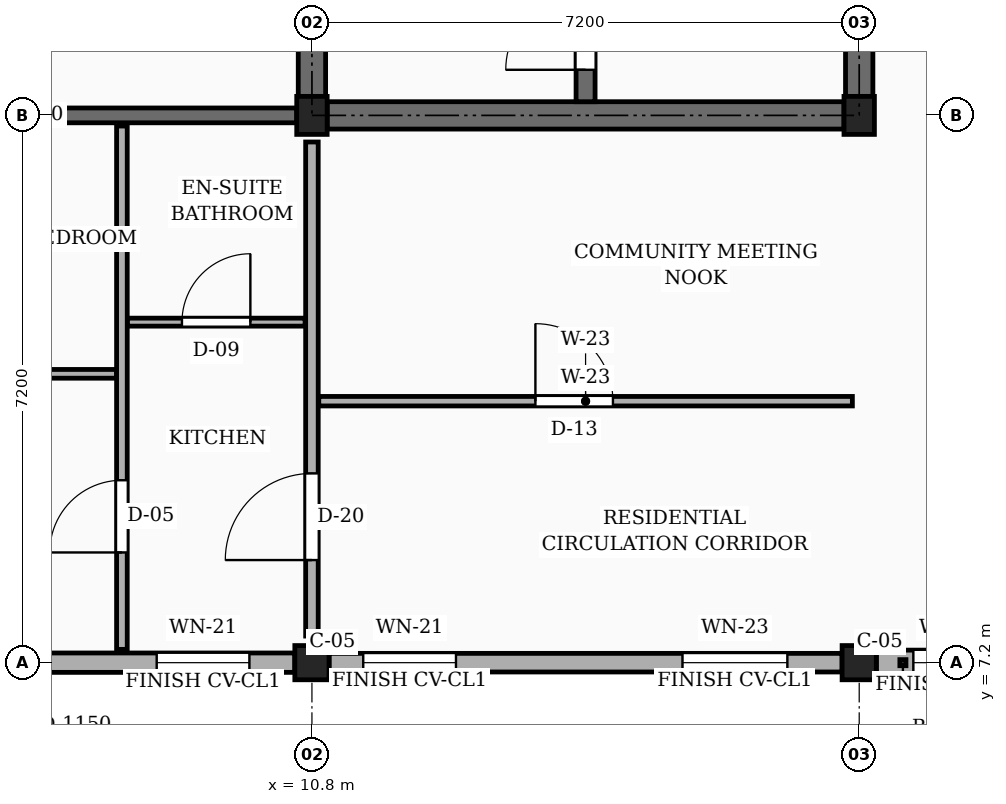
"""IFC4 building model, lengths in metres.
Left out: names, types, materials, properties, quantities, classifications, styles, units other than length and angle.
Written with IfcOpenShell. Run it as: python <this file> out.ifc"""

import sys

from ifc_helpers import new_model, si_unit, direction, frame, frame_2d, origin, origin_2d, place, context, subcontext, project, spatial, rectangle, extrude, element, fill, save


model = new_model("IFC4")
c1 = context("Model", 3, precision=1e-05, world=origin(), true_north=direction((0.0, 1.0)))
c2 = subcontext(c1, "Body", "Model", "MODEL_VIEW")
j1 = project(units=[si_unit("LENGTHUNIT", "METRE"), si_unit("PLANEANGLEUNIT", "RADIAN")], contexts=[c1])
p1 = place(None, origin())
s1 = spatial("IfcSite", under=j1, at=p1, CompositionType="ELEMENT")
p2 = place(p1, origin())
s2 = spatial("IfcBuilding", under=s1, at=p2, CompositionType="ELEMENT")
p3 = place(p2, frame((0.0, 0.0, 39.15)))
s3 = spatial("IfcBuildingStorey", under=s2, at=p3, CompositionType="ELEMENT", Elevation=39.15)
p4 = place(p3, frame((10.8, 7.2, 0.0), z_axis=(0.0, 0.0, 1.0), x_axis=(1.0, 0.0, 0.0)))
e1 = element("IfcColumn", 1, at=p4, inside=s3, PredefinedType="COLUMN", context=c2, shape_type="SweptSolid", body=[
    extrude(rectangle(XDim=0.45, YDim=0.45, at=origin_2d()), origin(), (0.0, 0.0, 1.0), 3.15),
])
p5 = place(p3, frame((10.8, 14.4, 0.0), z_axis=(0.0, 0.0, 1.0), x_axis=(1.0, 0.0, 0.0)))
e2 = element("IfcColumn", 2, at=p5, inside=s3, PredefinedType="COLUMN", context=c2, shape_type="SweptSolid", body=[
    extrude(rectangle(XDim=0.4, YDim=0.5, at=origin_2d()), origin(), (0.0, 0.0, 1.0), 3.15),
])
p6 = place(p3, frame((18.0, 7.2, 0.0), z_axis=(0.0, 0.0, 1.0), x_axis=(1.0, 0.0, 0.0)))
e3 = element("IfcColumn", 3, at=p6, inside=s3, PredefinedType="COLUMN", context=c2, shape_type="SweptSolid", body=[
    extrude(rectangle(XDim=0.45, YDim=0.45, at=origin_2d()), origin(), (0.0, 0.0, 1.0), 3.15),
])
p7 = place(p3, frame((18.0, 14.4, 0.0), z_axis=(0.0, 0.0, 1.0), x_axis=(1.0, 0.0, 0.0)))
e4 = element("IfcColumn", 4, at=p7, inside=s3, PredefinedType="COLUMN", context=c2, shape_type="SweptSolid", body=[
    extrude(rectangle(XDim=0.4, YDim=0.5, at=origin_2d()), origin(), (0.0, 0.0, 1.0), 3.15),
])
p8 = place(p3, frame((3.825, 14.4, 0.0), z_axis=(0.0, 0.0, 1.0), x_axis=(1.0, 0.0, 0.0)))
e5 = element("IfcWall", 5, at=p8, inside=s3, PredefinedType="SOLIDWALL", context=c2, shape_type="SweptSolid", body=[
    extrude(rectangle(XDim=6.775, YDim=0.195, at=frame_2d((3.388, 0.0))), origin(), (0.0, 0.0, 1.0), 2.17),
])
p9 = place(p8, frame((1.35, 0.0, 0.0)))
e6 = element("IfcOpeningElement", 6, at=p9, cuts=e5, PredefinedType="OPENING", context=c2, shape_type="SweptSolid", body=[
    extrude(rectangle(XDim=0.98, YDim=2.12, at=frame_2d((0.49, 1.06))), frame((0.0, 0.107, 0.0), z_axis=(0.0, -1.0, 0.0), x_axis=(1.0, 0.0, 0.0)), (0.0, 0.0, 1.0), 0.215),
])
p10 = place(p3, frame((3.825, 7.2, 0.0), z_axis=(0.0, 0.0, 1.0), x_axis=(1.0, 0.0, 0.0)))
e7 = element("IfcWall", 7, at=p10, inside=s3, PredefinedType="SOLIDWALL", context=c2, shape_type="SweptSolid", body=[
    extrude(rectangle(XDim=6.75, YDim=0.255, at=frame_2d((3.375, 0.0))), origin(), (0.0, 0.0, 1.0), 2.44),
])
p11 = place(p10, frame((1.778, 0.0, 0.78)))
e8 = element("IfcOpeningElement", 8, at=p11, cuts=e7, PredefinedType="OPENING", context=c2, shape_type="SweptSolid", body=[
    extrude(rectangle(XDim=1.06, YDim=1.36, at=frame_2d((0.53, 0.68))), frame((0.0, 0.137, 0.0), z_axis=(0.0, -1.0, 0.0), x_axis=(1.0, 0.0, 0.0)), (0.0, 0.0, 1.0), 0.275),
])
p12 = place(p10, frame((4.933, 0.0, 0.78)))
e9 = element("IfcOpeningElement", 9, at=p12, cuts=e7, PredefinedType="OPENING", context=c2, shape_type="SweptSolid", body=[
    extrude(rectangle(XDim=1.22, YDim=1.36, at=frame_2d((0.61, 0.68))), frame((0.0, 0.137, 0.0), z_axis=(0.0, -1.0, 0.0), x_axis=(1.0, 0.0, 0.0)), (0.0, 0.0, 1.0), 0.275),
])
p13 = place(p3, frame((11.025, 7.2, 0.0), z_axis=(0.0, 0.0, 1.0), x_axis=(1.0, 0.0, 0.0)))
e10 = element("IfcWall", 10, at=p13, inside=s3, PredefinedType="SOLIDWALL", context=c2, shape_type="SweptSolid", body=[
    extrude(rectangle(XDim=6.75, YDim=0.245, at=frame_2d((3.375, 0.0))), origin(), (0.0, 0.0, 1.0), 2.44),
])
p14 = place(p13, frame((0.45, 0.0, 0.78)))
e11 = element("IfcOpeningElement", 11, at=p14, cuts=e10, PredefinedType="OPENING", context=c2, shape_type="SweptSolid", body=[
    extrude(rectangle(XDim=1.22, YDim=1.36, at=frame_2d((0.61, 0.68))), frame((0.0, 0.133, 0.0), z_axis=(0.0, -1.0, 0.0), x_axis=(1.0, 0.0, 0.0)), (0.0, 0.0, 1.0), 0.265),
])
p15 = place(p13, frame((4.65, 0.0, 0.78)))
e12 = element("IfcOpeningElement", 12, at=p15, cuts=e10, PredefinedType="OPENING", context=c2, shape_type="SweptSolid", body=[
    extrude(rectangle(XDim=1.38, YDim=1.36, at=frame_2d((0.69, 0.68))), frame((0.0, 0.133, 0.0), z_axis=(0.0, -1.0, 0.0), x_axis=(1.0, 0.0, 0.0)), (0.0, 0.0, 1.0), 0.265),
])
p16 = place(p3, frame((18.225, 7.2, 0.0), z_axis=(0.0, 0.0, 1.0), x_axis=(1.0, 0.0, 0.0)))
e13 = element("IfcWall", 13, at=p16, inside=s3, PredefinedType="SOLIDWALL", context=c2, shape_type="SweptSolid", body=[
    extrude(rectangle(XDim=6.75, YDim=0.33, at=frame_2d((3.375, 0.0))), origin(), (0.0, 0.0, 1.0), 2.44),
])
p17 = place(p16, frame((0.488, 0.0, 0.78)))
e14 = element("IfcOpeningElement", 14, at=p17, cuts=e13, PredefinedType="OPENING", context=c2, shape_type="SweptSolid", body=[
    extrude(rectangle(XDim=1.04, YDim=1.26, at=frame_2d((0.52, 0.63))), frame((0.0, 0.175, 0.0), z_axis=(0.0, -1.0, 0.0), x_axis=(1.0, 0.0, 0.0)), (0.0, 0.0, 1.0), 0.35),
])
p18 = place(p16, frame((2.355, 0.0, 0.78)))
e15 = element("IfcOpeningElement", 15, at=p18, cuts=e13, PredefinedType="OPENING", context=c2, shape_type="SweptSolid", body=[
    extrude(rectangle(XDim=0.94, YDim=1.44, at=frame_2d((0.47, 0.72))), frame((0.0, 0.175, 0.0), z_axis=(0.0, -1.0, 0.0), x_axis=(1.0, 0.0, 0.0)), (0.0, 0.0, 1.0), 0.35),
])
p19 = place(p16, frame((4.617, 0.0, 0.78)))
e16 = element("IfcOpeningElement", 16, at=p19, cuts=e13, PredefinedType="OPENING", context=c2, shape_type="SweptSolid", body=[
    extrude(rectangle(XDim=1.15, YDim=1.44, at=frame_2d((0.575, 0.72))), frame((0.0, 0.175, 0.0), z_axis=(0.0, -1.0, 0.0), x_axis=(1.0, 0.0, 0.0)), (0.0, 0.0, 1.0), 0.35),
])
p20 = place(p3, frame((10.8, 14.65, 0.0), z_axis=(0.0, 0.0, 1.0), x_axis=(0.0, 1.0, 0.0)))
e17 = element("IfcWall", 17, at=p20, inside=s3, PredefinedType="SHEAR", context=c2, shape_type="SweptSolid", body=[
    extrude(rectangle(XDim=6.7, YDim=0.36, at=frame_2d((3.35, 0.0))), origin(), (0.0, 0.0, 1.0), 2.87),
])
p21 = place(p3, frame((18.0, 14.65, 0.0), z_axis=(0.0, 0.0, 1.0), x_axis=(0.0, 1.0, 0.0)))
e18 = element("IfcWall", 18, at=p21, inside=s3, PredefinedType="SHEAR", context=c2, shape_type="SweptSolid", body=[
    extrude(rectangle(XDim=6.7, YDim=0.36, at=frame_2d((3.35, 0.0))), origin(), (0.0, 0.0, 1.0), 2.87),
])
p22 = place(p21, frame((1.5, 0.0, 0.0)))
e19 = element("IfcOpeningElement", 19, at=p22, cuts=e18, PredefinedType="OPENING", context=c2, shape_type="SweptSolid", body=[
    extrude(rectangle(XDim=1.1, YDim=2.15, at=frame_2d((0.55, 1.075))), frame((0.0, 0.19, 0.0), z_axis=(0.0, -1.0, 0.0), x_axis=(1.0, 0.0, 0.0)), (0.0, 0.0, 1.0), 0.38),
])
p23 = place(p3, frame((11.0, 14.4, 0.0), z_axis=(0.0, 0.0, 1.0), x_axis=(1.0, 0.0, 0.0)))
e20 = element("IfcWall", 20, at=p23, inside=s3, PredefinedType="SHEAR", context=c2, shape_type="SweptSolid", body=[
    extrude(rectangle(XDim=6.8, YDim=0.36, at=frame_2d((3.4, 0.0))), origin(), (0.0, 0.0, 1.0), 2.87),
])
p24 = place(p3, frame((14.4, 14.58, 0.0), z_axis=(0.0, 0.0, 1.0), x_axis=(0.0, 1.0, 0.0)))
e21 = element("IfcWall", 21, at=p24, inside=s3, PredefinedType="SHEAR", context=c2, shape_type="SweptSolid", body=[
    extrude(rectangle(XDim=6.84, YDim=0.25, at=frame_2d((3.42, 0.0))), origin(), (0.0, 0.0, 1.0), 2.87),
])
p25 = place(p24, frame((0.42, 0.0, 0.0)))
e22 = element("IfcOpeningElement", 22, at=p25, cuts=e21, PredefinedType="OPENING", context=c2, shape_type="SweptSolid", body=[
    extrude(rectangle(XDim=1.05, YDim=2.15, at=frame_2d((0.525, 1.075))), frame((0.0, 0.135, 0.0), z_axis=(0.0, -1.0, 0.0), x_axis=(1.0, 0.0, 0.0)), (0.0, 0.0, 1.0), 0.27),
])
p26 = place(p3, frame((10.8, 7.55, 0.0), z_axis=(0.0, 0.0, 1.0), x_axis=(0.0, 1.0, 0.0)))
e23 = element("IfcWall", 23, at=p26, inside=s3, PredefinedType="PARTITIONING", context=c2, shape_type="SweptSolid", body=[
    extrude(rectangle(XDim=6.5, YDim=0.165, at=frame_2d((3.25, 0.0))), origin(), (0.0, 0.0, 1.0), 2.305),
])
p27 = place(p26, frame((1.0, 0.0, 0.0)))
e24 = element("IfcOpeningElement", 24, at=p27, cuts=e23, PredefinedType="OPENING", context=c2, shape_type="SweptSolid", body=[
    extrude(rectangle(XDim=1.14, YDim=2.18, at=frame_2d((0.57, 1.09))), frame((0.0, 0.093, 0.0), z_axis=(0.0, -1.0, 0.0), x_axis=(1.0, 0.0, 0.0)), (0.0, 0.0, 1.0), 0.185),
])
p28 = place(p3, frame((10.89, 10.64, 0.0), z_axis=(0.0, 0.0, 1.0), x_axis=(1.0, 0.0, 0.0)))
e25 = element("IfcWall", 25, at=p28, inside=s3, PredefinedType="PARTITIONING", context=c2, shape_type="SweptSolid", body=[
    extrude(rectangle(XDim=7.02, YDim=0.125, at=frame_2d((3.51, 0.0))), origin(), (0.0, 0.0, 1.0), 2.305),
])
p29 = place(p28, frame((2.85, 0.0, 0.0)))
e26 = element("IfcOpeningElement", 26, at=p29, cuts=e25, PredefinedType="OPENING", context=c2, shape_type="SweptSolid", body=[
    extrude(rectangle(XDim=1.02, YDim=2.15, at=frame_2d((0.51, 1.075))), frame((0.0, 0.073, 0.0), z_axis=(0.0, -1.0, 0.0), x_axis=(1.0, 0.0, 0.0)), (0.0, 0.0, 1.0), 0.145),
])
p30 = place(p3, frame((3.775, 11.0, 0.0), z_axis=(0.0, 0.0, 1.0), x_axis=(1.0, 0.0, 0.0)))
e27 = element("IfcWall", 27, at=p30, inside=s3, PredefinedType="PARTITIONING", context=c2, shape_type="SweptSolid", body=[
    extrude(rectangle(XDim=4.455, YDim=0.115, at=frame_2d((2.228, 0.0))), origin(), (0.0, 0.0, 1.0), 2.305),
])
p31 = place(p30, frame((1.778, 0.0, 0.0)))
e28 = element("IfcOpeningElement", 28, at=p31, cuts=e27, PredefinedType="OPENING", context=c2, shape_type="SweptSolid", body=[
    extrude(rectangle(XDim=0.9, YDim=2.1, at=frame_2d((0.45, 1.05))), frame((0.0, 0.067, 0.0), z_axis=(0.0, -1.0, 0.0), x_axis=(1.0, 0.0, 0.0)), (0.0, 0.0, 1.0), 0.135),
])
p32 = place(p3, frame((8.37, 11.68, 0.0), z_axis=(0.0, 0.0, 1.0), x_axis=(1.0, 0.0, 0.0)))
e29 = element("IfcWall", 29, at=p32, inside=s3, PredefinedType="PARTITIONING", context=c2, shape_type="SweptSolid", body=[
    extrude(rectangle(XDim=2.34, YDim=0.105, at=frame_2d((1.17, 0.0))), origin(), (0.0, 0.0, 1.0), 2.305),
])
p33 = place(p32, frame((0.72, 0.0, 0.0)))
e30 = element("IfcOpeningElement", 30, at=p33, cuts=e29, PredefinedType="OPENING", context=c2, shape_type="SweptSolid", body=[
    extrude(rectangle(XDim=0.9, YDim=2.05, at=frame_2d((0.45, 1.025))), frame((0.0, 0.062, 0.0), z_axis=(0.0, -1.0, 0.0), x_axis=(1.0, 0.0, 0.0)), (0.0, 0.0, 1.0), 0.125),
])
p34 = place(p3, frame((8.3, 7.375, 0.0), z_axis=(0.0, 0.0, 1.0), x_axis=(0.0, 1.0, 0.0)))
e31 = element("IfcWall", 31, at=p34, inside=s3, PredefinedType="PARTITIONING", context=c2, shape_type="SweptSolid", body=[
    extrude(rectangle(XDim=6.885, YDim=0.14, at=frame_2d((3.442, 0.0))), origin(), (0.0, 0.0, 1.0), 2.305),
])
p35 = place(p34, frame((1.275, 0.0, 0.0)))
e32 = element("IfcOpeningElement", 32, at=p35, cuts=e31, PredefinedType="OPENING", context=c2, shape_type="SweptSolid", body=[
    extrude(rectangle(XDim=0.95, YDim=2.1, at=frame_2d((0.475, 1.05))), frame((0.0, 0.08, 0.0), z_axis=(0.0, -1.0, 0.0), x_axis=(1.0, 0.0, 0.0)), (0.0, 0.0, 1.0), 0.16),
])
p36 = place(p12, origin())
e33 = element("IfcWindow", 33, at=p36, inside=s3, PartitioningType="SINGLE_PANEL", PredefinedType="WINDOW", context=c2, shape_type="SweptSolid", body=[
    extrude(rectangle(XDim=1.22, YDim=1.36, at=frame_2d((0.61, 0.68))), frame((0.0, 0.03, 0.0), z_axis=(0.0, -1.0, 0.0), x_axis=(1.0, 0.0, 0.0)), (0.0, 0.0, 1.0), 0.06),
])
fill(e9, e33)
p37 = place(p14, origin())
e34 = element("IfcWindow", 34, at=p37, inside=s3, PartitioningType="SINGLE_PANEL", PredefinedType="WINDOW", context=c2, shape_type="SweptSolid", body=[
    extrude(rectangle(XDim=1.22, YDim=1.36, at=frame_2d((0.61, 0.68))), frame((0.0, 0.03, 0.0), z_axis=(0.0, -1.0, 0.0), x_axis=(1.0, 0.0, 0.0)), (0.0, 0.0, 1.0), 0.06),
])
fill(e11, e34)
p38 = place(p15, origin())
e35 = element("IfcWindow", 35, at=p38, inside=s3, PartitioningType="SINGLE_PANEL", PredefinedType="WINDOW", context=c2, shape_type="SweptSolid", body=[
    extrude(rectangle(XDim=1.38, YDim=1.36, at=frame_2d((0.69, 0.68))), frame((0.0, 0.03, 0.0), z_axis=(0.0, -1.0, 0.0), x_axis=(1.0, 0.0, 0.0)), (0.0, 0.0, 1.0), 0.06),
])
fill(e12, e35)
p39 = place(p17, origin())
e36 = element("IfcWindow", 36, at=p39, inside=s3, PartitioningType="SINGLE_PANEL", PredefinedType="WINDOW", context=c2, shape_type="SweptSolid", body=[
    extrude(rectangle(XDim=1.04, YDim=1.26, at=frame_2d((0.52, 0.63))), frame((0.0, 0.03, 0.0), z_axis=(0.0, -1.0, 0.0), x_axis=(1.0, 0.0, 0.0)), (0.0, 0.0, 1.0), 0.06),
])
fill(e14, e36)
p40 = place(p25, origin())
e37 = element("IfcDoor", 37, at=p40, inside=s3, OperationType="SINGLE_SWING_LEFT", PredefinedType="DOOR", context=c2, shape_type="SweptSolid", body=[
    extrude(rectangle(XDim=1.05, YDim=2.15, at=frame_2d((0.525, 1.075))), frame((0.0, 0.025, 0.0), z_axis=(0.0, -1.0, 0.0), x_axis=(1.0, 0.0, 0.0)), (0.0, 0.0, 1.0), 0.05),
])
fill(e22, e37)
p41 = place(p27, origin())
e38 = element("IfcDoor", 38, at=p41, inside=s3, OperationType="SINGLE_SWING_LEFT", PredefinedType="DOOR", context=c2, shape_type="SweptSolid", body=[
    extrude(rectangle(XDim=1.14, YDim=2.18, at=frame_2d((0.57, 1.09))), frame((0.0, 0.025, 0.0), z_axis=(0.0, -1.0, 0.0), x_axis=(1.0, 0.0, 0.0)), (0.0, 0.0, 1.0), 0.05),
])
fill(e24, e38)
p42 = place(p29, origin())
e39 = element("IfcDoor", 39, at=p42, inside=s3, OperationType="SINGLE_SWING_LEFT", PredefinedType="DOOR", context=c2, shape_type="SweptSolid", body=[
    extrude(rectangle(XDim=1.02, YDim=2.15, at=frame_2d((0.51, 1.075))), frame((0.0, 0.025, 0.0), z_axis=(0.0, -1.0, 0.0), x_axis=(1.0, 0.0, 0.0)), (0.0, 0.0, 1.0), 0.05),
])
fill(e26, e39)
p43 = place(p33, origin())
e40 = element("IfcDoor", 40, at=p43, inside=s3, OperationType="SINGLE_SWING_RIGHT", PredefinedType="DOOR", context=c2, shape_type="SweptSolid", body=[
    extrude(rectangle(XDim=0.9, YDim=2.05, at=frame_2d((0.45, 1.025))), frame((0.0, 0.025, 0.0), z_axis=(0.0, -1.0, 0.0), x_axis=(1.0, 0.0, 0.0)), (0.0, 0.0, 1.0), 0.05),
])
fill(e30, e40)
p44 = place(p35, origin())
e41 = element("IfcDoor", 41, at=p44, inside=s3, OperationType="SINGLE_SWING_LEFT", PredefinedType="DOOR", context=c2, shape_type="SweptSolid", body=[
    extrude(rectangle(XDim=0.95, YDim=2.1, at=frame_2d((0.475, 1.05))), frame((0.0, 0.025, 0.0), z_axis=(0.0, -1.0, 0.0), x_axis=(1.0, 0.0, 0.0)), (0.0, 0.0, 1.0), 0.05),
])
fill(e32, e41)
save(model, sys.argv[1])
